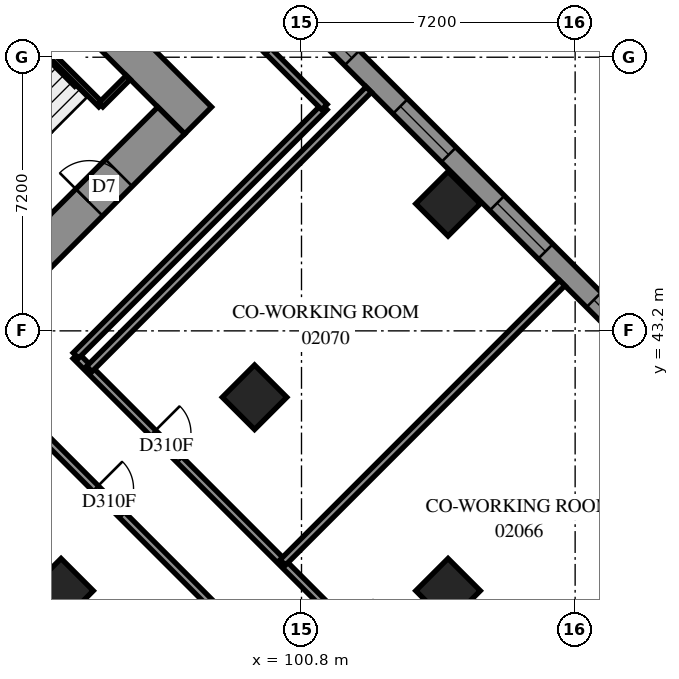
"""IFC4 building model, lengths in metres.
Left out: names, types, materials, properties, quantities, classifications, styles, units other than length and angle.
Written with IfcOpenShell. Run it as: python <this file> out.ifc"""

import sys

from ifc_helpers import new_model, si_unit, direction, frame, frame_2d, origin, origin_2d, place, context, subcontext, project, spatial, polyline, rectangle, outline, extrude, element, fill, save


model = new_model("IFC4")
c1 = context("Model", 3, precision=1e-05, world=origin(), true_north=direction((0.0, 1.0)))
c2 = subcontext(c1, "Body", "Model", "MODEL_VIEW")
j1 = project(units=[si_unit("LENGTHUNIT", "METRE"), si_unit("PLANEANGLEUNIT", "RADIAN")], contexts=[c1])
p1 = place(None, origin())
s1 = spatial("IfcSite", under=j1, at=p1, CompositionType="ELEMENT")
p2 = place(p1, origin())
s2 = spatial("IfcBuilding", under=s1, at=p2, CompositionType="ELEMENT")
p3 = place(p2, frame((0.0, 0.0, 10.2)))
s3 = spatial("IfcBuildingStorey", under=s2, at=p3, CompositionType="ELEMENT", Elevation=10.2)
for number, where, z_axis, x_axis in (
    (1, (104.656, 46.544, 0.0), (0.0, 0.0, 1.0), (0.707, -0.707, 0.0)),
    (2, (99.565, 41.453, 0.0), (0.0, 0.0, 1.0), (0.707, -0.707, 0.0)),
    (3, (94.474, 36.362, 0.0), (0.0, 0.0, 1.0), (0.707, -0.707, 0.0)),
    (4, (104.656, 36.362, 0.0), (0.0, 0.0, 1.0), (0.707, -0.707, 0.0)),
):
    element("IfcColumn", number, at=place(p3, frame(where, z_axis=z_axis, x_axis=x_axis)), inside=s3, PredefinedType="COLUMN", context=c2, shape_type="SweptSolid", body=[
        extrude(rectangle(XDim=1.2, YDim=1.2, at=origin_2d()), origin(), (0.0, 0.0, 1.0), 3.8),
    ])
p4 = place(p3, frame((86.483, 60.333, -0.4), z_axis=(0.0, 0.0, 1.0), x_axis=(0.70710983, -0.7071037324, 0.0)))
e5 = element("IfcWall", 5, at=p4, inside=s3, PredefinedType="SHEAR", context=c2, shape_type="SweptSolid", body=[
    extrude(rectangle(XDim=16.4, YDim=1.0, at=frame_2d((8.2, 0.0))), origin(), (0.0, 0.0, 1.0), 3.5),
])
p5 = place(p4, frame((11.0, 0.0, 0.4)))
e6 = element("IfcOpeningElement", 6, at=p5, cuts=e5, PredefinedType="OPENING", context=c2, shape_type="SweptSolid", body=[
    extrude(rectangle(XDim=0.8, YDim=2.1, at=frame_2d((0.4, 1.05))), frame((0.0, 0.51, 0.0), z_axis=(0.0, -1.0, 0.0), x_axis=(1.0, 0.0, 0.0)), (0.0, 0.0, 1.0), 1.02),
])
p6 = place(p3, frame((87.19, 38.554, -0.4), z_axis=(0.0, 0.0, 1.0), x_axis=(0.707103309, 0.7071102534, 0.0)))
e7 = element("IfcWall", 7, at=p6, inside=s3, PredefinedType="SHEAR", context=c2, shape_type="SweptSolid", body=[
    extrude(rectangle(XDim=14.4, YDim=1.0, at=frame_2d((7.2, 0.0))), origin(), (0.0, 0.0, 1.0), 3.5),
])
p7 = place(p6, frame((4.55, 0.0, 0.4)))
e8 = element("IfcOpeningElement", 8, at=p7, cuts=e7, PredefinedType="OPENING", context=c2, shape_type="SweptSolid", body=[
    extrude(rectangle(XDim=1.1, YDim=2.1, at=frame_2d((0.55, 1.05))), frame((0.0, 0.51, 0.0), z_axis=(0.0, -1.0, 0.0), x_axis=(1.0, 0.0, 0.0)), (0.0, 0.0, 1.0), 1.02),
])
p8 = place(p6, frame((11.35, 0.0, 0.4)))
e9 = element("IfcOpeningElement", 9, at=p8, cuts=e7, PredefinedType="OPENING", context=c2, shape_type="SweptSolid", body=[
    extrude(rectangle(XDim=1.1, YDim=2.1, at=frame_2d((0.55, 1.05))), frame((0.0, 0.51, 0.0), z_axis=(0.0, -1.0, 0.0), x_axis=(1.0, 0.0, 0.0)), (0.0, 0.0, 1.0), 1.02),
])
p9 = place(p3, frame((117.843, 34.665, 0.0), z_axis=(0.0, 0.0, 1.0), x_axis=(-0.7071067812, 0.7071067812, 0.0)))
e10 = element("IfcWall", 10, at=p9, inside=s3, PredefinedType="SOLIDWALL", context=c2, shape_type="SweptSolid", body=[
    extrude(outline(polyline([(-0.275, -0.275), (54.222, -0.275), (53.994, 0.275), (0.275, 0.275), (-0.275, -0.275)])), origin(), (0.0, 0.0, 1.0), 3.8),
])
p10 = place(p9, frame((0.8, 0.0, 0.7)))
e11 = element("IfcOpeningElement", 11, at=p10, cuts=e10, PredefinedType="OPENING", context=c2, shape_type="SweptSolid", body=[
    extrude(rectangle(XDim=1.8, YDim=2.6, at=frame_2d((0.9, 1.3))), frame((0.0, 0.285, 0.0), z_axis=(0.0, -1.0, 0.0), x_axis=(1.0, 0.0, 0.0)), (0.0, 0.0, 1.0), 0.57),
])
p11 = place(p9, frame((4.225, 0.0, 0.7)))
e12 = element("IfcOpeningElement", 12, at=p11, cuts=e10, PredefinedType="OPENING", context=c2, shape_type="SweptSolid", body=[
    extrude(rectangle(XDim=1.8, YDim=2.6, at=frame_2d((0.9, 1.3))), frame((0.0, 0.285, 0.0), z_axis=(0.0, -1.0, 0.0), x_axis=(1.0, 0.0, 0.0)), (0.0, 0.0, 1.0), 0.57),
])
p12 = place(p9, frame((7.825, 0.0, 0.7)))
e13 = element("IfcOpeningElement", 13, at=p12, cuts=e10, PredefinedType="OPENING", context=c2, shape_type="SweptSolid", body=[
    extrude(rectangle(XDim=1.8, YDim=2.6, at=frame_2d((0.9, 1.3))), frame((0.0, 0.285, 0.0), z_axis=(0.0, -1.0, 0.0), x_axis=(1.0, 0.0, 0.0)), (0.0, 0.0, 1.0), 0.57),
])
p13 = place(p9, frame((11.425, 0.0, 0.7)))
e14 = element("IfcOpeningElement", 14, at=p13, cuts=e10, PredefinedType="OPENING", context=c2, shape_type="SweptSolid", body=[
    extrude(rectangle(XDim=1.8, YDim=2.6, at=frame_2d((0.9, 1.3))), frame((0.0, 0.285, 0.0), z_axis=(0.0, -1.0, 0.0), x_axis=(1.0, 0.0, 0.0)), (0.0, 0.0, 1.0), 0.57),
])
p14 = place(p9, frame((15.025, 0.0, 0.7)))
e15 = element("IfcOpeningElement", 15, at=p14, cuts=e10, PredefinedType="OPENING", context=c2, shape_type="SweptSolid", body=[
    extrude(rectangle(XDim=1.8, YDim=2.6, at=frame_2d((0.9, 1.3))), frame((0.0, 0.285, 0.0), z_axis=(0.0, -1.0, 0.0), x_axis=(1.0, 0.0, 0.0)), (0.0, 0.0, 1.0), 0.57),
])
p15 = place(p9, frame((18.625, 0.0, 0.7)))
e16 = element("IfcOpeningElement", 16, at=p15, cuts=e10, PredefinedType="OPENING", context=c2, shape_type="SweptSolid", body=[
    extrude(rectangle(XDim=1.8, YDim=2.6, at=frame_2d((0.9, 1.3))), frame((0.0, 0.285, 0.0), z_axis=(0.0, -1.0, 0.0), x_axis=(1.0, 0.0, 0.0)), (0.0, 0.0, 1.0), 0.57),
])
p16 = place(p9, frame((22.225, 0.0, 0.7)))
e17 = element("IfcOpeningElement", 17, at=p16, cuts=e10, PredefinedType="OPENING", context=c2, shape_type="SweptSolid", body=[
    extrude(rectangle(XDim=1.8, YDim=2.6, at=frame_2d((0.9, 1.3))), frame((0.0, 0.285, 0.0), z_axis=(0.0, -1.0, 0.0), x_axis=(1.0, 0.0, 0.0)), (0.0, 0.0, 1.0), 0.57),
])
p17 = place(p9, frame((25.825, 0.0, 0.7)))
e18 = element("IfcOpeningElement", 18, at=p17, cuts=e10, PredefinedType="OPENING", context=c2, shape_type="SweptSolid", body=[
    extrude(rectangle(XDim=1.8, YDim=2.6, at=frame_2d((0.9, 1.3))), frame((0.0, 0.285, 0.0), z_axis=(0.0, -1.0, 0.0), x_axis=(1.0, 0.0, 0.0)), (0.0, 0.0, 1.0), 0.57),
])
p18 = place(p9, frame((29.425, 0.0, 0.7)))
e19 = element("IfcOpeningElement", 19, at=p18, cuts=e10, PredefinedType="OPENING", context=c2, shape_type="SweptSolid", body=[
    extrude(rectangle(XDim=1.8, YDim=2.6, at=frame_2d((0.9, 1.3))), frame((0.0, 0.285, 0.0), z_axis=(0.0, -1.0, 0.0), x_axis=(1.0, 0.0, 0.0)), (0.0, 0.0, 1.0), 0.57),
])
p19 = place(p9, frame((33.025, 0.0, 0.7)))
e20 = element("IfcOpeningElement", 20, at=p19, cuts=e10, PredefinedType="OPENING", context=c2, shape_type="SweptSolid", body=[
    extrude(rectangle(XDim=1.8, YDim=2.6, at=frame_2d((0.9, 1.3))), frame((0.0, 0.285, 0.0), z_axis=(0.0, -1.0, 0.0), x_axis=(1.0, 0.0, 0.0)), (0.0, 0.0, 1.0), 0.57),
])
p20 = place(p9, frame((36.625, 0.0, 0.7)))
e21 = element("IfcOpeningElement", 21, at=p20, cuts=e10, PredefinedType="OPENING", context=c2, shape_type="SweptSolid", body=[
    extrude(rectangle(XDim=1.8, YDim=2.6, at=frame_2d((0.9, 1.3))), frame((0.0, 0.285, 0.0), z_axis=(0.0, -1.0, 0.0), x_axis=(1.0, 0.0, 0.0)), (0.0, 0.0, 1.0), 0.57),
])
p21 = place(p9, frame((40.225, 0.0, 0.7)))
e22 = element("IfcOpeningElement", 22, at=p21, cuts=e10, PredefinedType="OPENING", context=c2, shape_type="SweptSolid", body=[
    extrude(rectangle(XDim=1.8, YDim=2.6, at=frame_2d((0.9, 1.3))), frame((0.0, 0.285, 0.0), z_axis=(0.0, -1.0, 0.0), x_axis=(1.0, 0.0, 0.0)), (0.0, 0.0, 1.0), 0.57),
])
p22 = place(p9, frame((43.825, 0.0, 0.7)))
e23 = element("IfcOpeningElement", 23, at=p22, cuts=e10, PredefinedType="OPENING", context=c2, shape_type="SweptSolid", body=[
    extrude(rectangle(XDim=1.8, YDim=2.6, at=frame_2d((0.9, 1.3))), frame((0.0, 0.285, 0.0), z_axis=(0.0, -1.0, 0.0), x_axis=(1.0, 0.0, 0.0)), (0.0, 0.0, 1.0), 0.57),
])
p23 = place(p9, frame((47.425, 0.0, 0.7)))
e24 = element("IfcOpeningElement", 24, at=p23, cuts=e10, PredefinedType="OPENING", context=c2, shape_type="SweptSolid", body=[
    extrude(rectangle(XDim=1.8, YDim=2.6, at=frame_2d((0.9, 1.3))), frame((0.0, 0.285, 0.0), z_axis=(0.0, -1.0, 0.0), x_axis=(1.0, 0.0, 0.0)), (0.0, 0.0, 1.0), 0.57),
])
p24 = place(p9, frame((50.96, 0.0, 0.7)))
e25 = element("IfcOpeningElement", 25, at=p24, cuts=e10, PredefinedType="OPENING", context=c2, shape_type="SweptSolid", body=[
    extrude(rectangle(XDim=1.8, YDim=2.6, at=frame_2d((0.9, 1.3))), frame((0.0, 0.285, 0.0), z_axis=(0.0, -1.0, 0.0), x_axis=(1.0, 0.0, 0.0)), (0.0, 0.0, 1.0), 0.57),
])
p25 = place(p3, frame((77.07, 42.275, 0.0), z_axis=(0.0, 0.0, 1.0), x_axis=(0.7071067812, -0.7071067812, 0.0)))
e26 = element("IfcWall", 26, at=p25, inside=s3, PredefinedType="SOLIDWALL", context=c2, shape_type="SweptSolid", body=[
    extrude(outline(polyline([(0.114, -0.275), (39.288, -0.275), (38.737, 0.275), (-0.114, 0.275), (0.114, -0.275)])), origin(), (0.0, 0.0, 1.0), 3.8),
])
p26 = place(p25, frame((2.837, 0.0, 0.7)))
e27 = element("IfcOpeningElement", 27, at=p26, cuts=e26, PredefinedType="OPENING", context=c2, shape_type="SweptSolid", body=[
    extrude(rectangle(XDim=1.8, YDim=2.6, at=frame_2d((0.9, 1.3))), frame((0.0, 0.285, 0.0), z_axis=(0.0, -1.0, 0.0), x_axis=(1.0, 0.0, 0.0)), (0.0, 0.0, 1.0), 0.57),
])
p27 = place(p25, frame((6.588, 0.0, 0.7)))
e28 = element("IfcOpeningElement", 28, at=p27, cuts=e26, PredefinedType="OPENING", context=c2, shape_type="SweptSolid", body=[
    extrude(rectangle(XDim=1.8, YDim=2.6, at=frame_2d((0.9, 1.3))), frame((0.0, 0.285, 0.0), z_axis=(0.0, -1.0, 0.0), x_axis=(1.0, 0.0, 0.0)), (0.0, 0.0, 1.0), 0.57),
])
p28 = place(p25, frame((10.188, 0.0, 0.7)))
e29 = element("IfcOpeningElement", 29, at=p28, cuts=e26, PredefinedType="OPENING", context=c2, shape_type="SweptSolid", body=[
    extrude(rectangle(XDim=1.8, YDim=2.6, at=frame_2d((0.9, 1.3))), frame((0.0, 0.285, 0.0), z_axis=(0.0, -1.0, 0.0), x_axis=(1.0, 0.0, 0.0)), (0.0, 0.0, 1.0), 0.57),
])
p29 = place(p25, frame((13.787, 0.0, 0.7)))
e30 = element("IfcOpeningElement", 30, at=p29, cuts=e26, PredefinedType="OPENING", context=c2, shape_type="SweptSolid", body=[
    extrude(rectangle(XDim=1.8, YDim=2.6, at=frame_2d((0.9, 1.3))), frame((0.0, 0.285, 0.0), z_axis=(0.0, -1.0, 0.0), x_axis=(1.0, 0.0, 0.0)), (0.0, 0.0, 1.0), 0.57),
])
p30 = place(p25, frame((17.387, 0.0, 0.7)))
e31 = element("IfcOpeningElement", 31, at=p30, cuts=e26, PredefinedType="OPENING", context=c2, shape_type="SweptSolid", body=[
    extrude(rectangle(XDim=1.8, YDim=2.6, at=frame_2d((0.9, 1.3))), frame((0.0, 0.285, 0.0), z_axis=(0.0, -1.0, 0.0), x_axis=(1.0, 0.0, 0.0)), (0.0, 0.0, 1.0), 0.57),
])
p31 = place(p25, frame((20.988, 0.0, 0.7)))
e32 = element("IfcOpeningElement", 32, at=p31, cuts=e26, PredefinedType="OPENING", context=c2, shape_type="SweptSolid", body=[
    extrude(rectangle(XDim=1.8, YDim=2.6, at=frame_2d((0.9, 1.3))), frame((0.0, 0.285, 0.0), z_axis=(0.0, -1.0, 0.0), x_axis=(1.0, 0.0, 0.0)), (0.0, 0.0, 1.0), 0.57),
])
p32 = place(p25, frame((24.587, 0.0, 0.7)))
e33 = element("IfcOpeningElement", 33, at=p32, cuts=e26, PredefinedType="OPENING", context=c2, shape_type="SweptSolid", body=[
    extrude(rectangle(XDim=1.8, YDim=2.6, at=frame_2d((0.9, 1.3))), frame((0.0, 0.285, 0.0), z_axis=(0.0, -1.0, 0.0), x_axis=(1.0, 0.0, 0.0)), (0.0, 0.0, 1.0), 0.57),
])
p33 = place(p25, frame((28.188, 0.0, 0.7)))
e34 = element("IfcOpeningElement", 34, at=p33, cuts=e26, PredefinedType="OPENING", context=c2, shape_type="SweptSolid", body=[
    extrude(rectangle(XDim=1.8, YDim=2.6, at=frame_2d((0.9, 1.3))), frame((0.0, 0.285, 0.0), z_axis=(0.0, -1.0, 0.0), x_axis=(1.0, 0.0, 0.0)), (0.0, 0.0, 1.0), 0.57),
])
p34 = place(p25, frame((31.788, 0.0, 0.7)))
e35 = element("IfcOpeningElement", 35, at=p34, cuts=e26, PredefinedType="OPENING", context=c2, shape_type="SweptSolid", body=[
    extrude(rectangle(XDim=1.8, YDim=2.6, at=frame_2d((0.9, 1.3))), frame((0.0, 0.285, 0.0), z_axis=(0.0, -1.0, 0.0), x_axis=(1.0, 0.0, 0.0)), (0.0, 0.0, 1.0), 0.57),
])
p35 = place(p25, frame((35.388, 0.0, 0.7)))
e36 = element("IfcOpeningElement", 36, at=p35, cuts=e26, PredefinedType="OPENING", context=c2, shape_type="SweptSolid", body=[
    extrude(rectangle(XDim=1.8, YDim=2.6, at=frame_2d((0.9, 1.3))), frame((0.0, 0.285, 0.0), z_axis=(0.0, -1.0, 0.0), x_axis=(1.0, 0.0, 0.0)), (0.0, 0.0, 1.0), 0.57),
])
p36 = place(p3, frame((91.313, 53.354, 0.0), z_axis=(0.0, 0.0, 1.0), x_axis=(0.7071067812, -0.7071067812, 0.0)))
e37 = element("IfcWall", 37, at=p36, inside=s3, PredefinedType="PARTITIONING", context=c2, shape_type="SweptSolid", body=[
    extrude(rectangle(XDim=5.95, YDim=0.15, at=frame_2d((2.975, 0.0))), origin(), (0.0, 0.0, 1.0), 3.8),
])
p37 = place(p3, frame((95.52, 49.146, 0.0), z_axis=(0.0, 0.0, 1.0), x_axis=(0.7071067812, 0.7071067812, 0.0)))
e38 = element("IfcWall", 38, at=p37, inside=s3, PredefinedType="PARTITIONING", context=c2, shape_type="SweptSolid", body=[
    extrude(rectangle(XDim=1.02, YDim=0.15, at=frame_2d((0.51, 0.0))), origin(), (0.0, 0.0, 1.0), 3.8),
])
p38 = place(p3, frame((94.861, 42.544, 0.0), z_axis=(0.0, 0.0, 1.0), x_axis=(0.7071067812, -0.7071067812, 0.0)))
e39 = element("IfcWall", 39, at=p38, inside=s3, PredefinedType="PARTITIONING", context=c2, shape_type="SweptSolid", body=[
    extrude(rectangle(XDim=25.699, YDim=0.2, at=frame_2d((12.85, 0.0))), origin(), (0.0, 0.0, 1.0), 3.8),
])
p39 = place(p38, frame((10.072, 0.0, 0.0)))
e40 = element("IfcOpeningElement", 40, at=p39, cuts=e39, PredefinedType="OPENING", context=c2, shape_type="SweptSolid", body=[
    extrude(rectangle(XDim=1.0, YDim=2.1, at=frame_2d((0.5, 1.05))), frame((0.0, 0.11, 0.0), z_axis=(0.0, -1.0, 0.0), x_axis=(1.0, 0.0, 0.0)), (0.0, 0.0, 1.0), 0.22),
])
p40 = place(p38, frame((2.872, 0.0, 0.0)))
e41 = element("IfcOpeningElement", 41, at=p40, cuts=e39, PredefinedType="OPENING", context=c2, shape_type="SweptSolid", body=[
    extrude(rectangle(XDim=1.0, YDim=2.1, at=frame_2d((0.5, 1.05))), frame((0.0, 0.11, 0.0), z_axis=(0.0, -1.0, 0.0), x_axis=(1.0, 0.0, 0.0)), (0.0, 0.0, 1.0), 0.22),
])
p41 = place(p38, frame((17.272, 0.0, 0.0)))
e42 = element("IfcOpeningElement", 42, at=p41, cuts=e39, PredefinedType="OPENING", context=c2, shape_type="SweptSolid", body=[
    extrude(rectangle(XDim=1.0, YDim=2.1, at=frame_2d((0.5, 1.05))), frame((0.0, 0.11, 0.0), z_axis=(0.0, -1.0, 0.0), x_axis=(1.0, 0.0, 0.0)), (0.0, 0.0, 1.0), 0.22),
])
p42 = place(p38, frame((22.606, 0.0, 0.0)))
e43 = element("IfcOpeningElement", 43, at=p42, cuts=e39, PredefinedType="OPENING", context=c2, shape_type="SweptSolid", body=[
    extrude(rectangle(XDim=1.0, YDim=2.1, at=frame_2d((0.5, 1.05))), frame((0.0, 0.11, 0.0), z_axis=(0.0, -1.0, 0.0), x_axis=(1.0, 0.0, 0.0)), (0.0, 0.0, 1.0), 0.22),
])
p43 = place(p3, frame((93.375, 41.061, 0.0), z_axis=(0.0, 0.0, 1.0), x_axis=(0.7071067812, -0.7071067812, 0.0)))
e44 = element("IfcWall", 44, at=p43, inside=s3, PredefinedType="PARTITIONING", context=c2, shape_type="SweptSolid", body=[
    extrude(rectangle(XDim=25.699, YDim=0.2, at=frame_2d((12.85, 0.0))), origin(), (0.0, 0.0, 1.0), 3.8),
])
p44 = place(p43, frame((2.837, 0.0, 0.0)))
e45 = element("IfcOpeningElement", 45, at=p44, cuts=e44, PredefinedType="OPENING", context=c2, shape_type="SweptSolid", body=[
    extrude(rectangle(XDim=1.0, YDim=2.1, at=frame_2d((0.5, 1.05))), frame((0.0, 0.11, 0.0), z_axis=(0.0, -1.0, 0.0), x_axis=(1.0, 0.0, 0.0)), (0.0, 0.0, 1.0), 0.22),
])
p45 = place(p43, frame((10.037, 0.0, 0.0)))
e46 = element("IfcOpeningElement", 46, at=p45, cuts=e44, PredefinedType="OPENING", context=c2, shape_type="SweptSolid", body=[
    extrude(rectangle(XDim=1.0, YDim=2.1, at=frame_2d((0.5, 1.05))), frame((0.0, 0.11, 0.0), z_axis=(0.0, -1.0, 0.0), x_axis=(1.0, 0.0, 0.0)), (0.0, 0.0, 1.0), 0.22),
])
p46 = place(p43, frame((15.425, 0.0, 0.0)))
e47 = element("IfcOpeningElement", 47, at=p46, cuts=e44, PredefinedType="OPENING", context=c2, shape_type="SweptSolid", body=[
    extrude(rectangle(XDim=1.0, YDim=2.1, at=frame_2d((0.5, 1.05))), frame((0.0, 0.11, 0.0), z_axis=(0.0, -1.0, 0.0), x_axis=(1.0, 0.0, 0.0)), (0.0, 0.0, 1.0), 0.22),
])
p47 = place(p43, frame((22.057, 0.0, 0.0)))
e48 = element("IfcOpeningElement", 48, at=p47, cuts=e44, PredefinedType="OPENING", context=c2, shape_type="SweptSolid", body=[
    extrude(rectangle(XDim=1.0, YDim=2.1, at=frame_2d((0.5, 1.05))), frame((0.0, 0.11, 0.0), z_axis=(0.0, -1.0, 0.0), x_axis=(1.0, 0.0, 0.0)), (0.0, 0.0, 1.0), 0.22),
])
for number, where, z_axis, x_axis in (
    (49, (105.398, 32.014, 0.0), (0.0, 0.0, 1.0), (0.707, 0.707, 0.0)),
    (50, (100.307, 37.105, 0.0), (0.0, 0.0, 1.0), (0.707, 0.707, 0.0)),
    (51, (95.215, 42.197, 0.0), (0.0, 0.0, 1.0), (0.707, 0.707, 0.0)),
):
    element("IfcWall", number, at=place(p3, frame(where, z_axis=z_axis, x_axis=x_axis)), inside=s3, PredefinedType="PARTITIONING", context=c2, shape_type="SweptSolid", body=[
        extrude(rectangle(XDim=10.4, YDim=0.2, at=frame_2d((5.2, 0.0))), origin(), (0.0, 0.0, 1.0), 3.8),
    ])
p48 = place(p3, frame((94.863, 42.551, 0.0), z_axis=(0.0, 0.0, 1.0), x_axis=(0.7071067812, 0.7071067812, 0.0)))
e52 = element("IfcWall", 52, at=p48, inside=s3, PredefinedType="PARTITIONING", context=c2, shape_type="SweptSolid", body=[
    extrude(rectangle(XDim=9.249, YDim=0.2, at=frame_2d((4.625, 0.0))), origin(), (0.0, 0.0, 1.0), 3.8),
])
p49 = place(p3, frame((99.918, 50.574, 0.0), z_axis=(0.0, 0.0, 1.0), x_axis=(0.7075827869, -0.7066304548, 0.0)))
e53 = element("IfcWall", 53, at=p49, inside=s3, PredefinedType="PARTITIONING", context=c2, shape_type="SweptSolid", body=[
    extrude(rectangle(XDim=2.1, YDim=0.2, at=frame_2d((1.05, 0.0))), origin(), (0.0, 0.0, 1.0), 3.8),
])
p50 = place(p3, frame((99.453, 51.033, 0.0), z_axis=(0.0, 0.0, 1.0), x_axis=(0.7071067812, -0.7071067812, 0.0)))
e54 = element("IfcWall", 54, at=p50, inside=s3, PredefinedType="PARTITIONING", context=c2, shape_type="SweptSolid", body=[
    extrude(rectangle(XDim=0.653, YDim=0.2, at=frame_2d((0.327, 0.0))), origin(), (0.0, 0.0, 1.0), 3.8),
])
p51 = place(p13, origin())
e55 = element("IfcWindow", 55, at=p51, inside=s3, PartitioningType="SINGLE_PANEL", PredefinedType="WINDOW", context=c2, shape_type="SweptSolid", body=[
    extrude(rectangle(XDim=1.8, YDim=2.6, at=frame_2d((0.9, 1.3))), frame((0.0, 0.155, 0.0), z_axis=(0.0, -1.0, 0.0), x_axis=(1.0, 0.0, 0.0)), (0.0, 0.0, 1.0), 0.06),
])
fill(e14, e55)
p52 = place(p14, origin())
e56 = element("IfcWindow", 56, at=p52, inside=s3, PartitioningType="SINGLE_PANEL", PredefinedType="WINDOW", context=c2, shape_type="SweptSolid", body=[
    extrude(rectangle(XDim=1.8, YDim=2.6, at=frame_2d((0.9, 1.3))), frame((0.0, 0.155, 0.0), z_axis=(0.0, -1.0, 0.0), x_axis=(1.0, 0.0, 0.0)), (0.0, 0.0, 1.0), 0.06),
])
fill(e15, e56)
p53 = place(p15, origin())
e57 = element("IfcWindow", 57, at=p53, inside=s3, PartitioningType="SINGLE_PANEL", PredefinedType="WINDOW", context=c2, shape_type="SweptSolid", body=[
    extrude(rectangle(XDim=1.8, YDim=2.6, at=frame_2d((0.9, 1.3))), frame((0.0, 0.155, 0.0), z_axis=(0.0, -1.0, 0.0), x_axis=(1.0, 0.0, 0.0)), (0.0, 0.0, 1.0), 0.06),
])
fill(e16, e57)
p54 = place(p16, origin())
e58 = element("IfcWindow", 58, at=p54, inside=s3, PartitioningType="SINGLE_PANEL", PredefinedType="WINDOW", context=c2, shape_type="SweptSolid", body=[
    extrude(rectangle(XDim=1.8, YDim=2.6, at=frame_2d((0.9, 1.3))), frame((0.0, 0.155, 0.0), z_axis=(0.0, -1.0, 0.0), x_axis=(1.0, 0.0, 0.0)), (0.0, 0.0, 1.0), 0.06),
])
fill(e17, e58)
p55 = place(p8, origin())
e59 = element("IfcDoor", 59, at=p55, inside=s3, OperationType="SINGLE_SWING_RIGHT", PredefinedType="DOOR", context=c2, shape_type="SweptSolid", body=[
    extrude(rectangle(XDim=1.1, YDim=2.1, at=frame_2d((0.55, 1.05))), frame((0.0, 0.025, 0.0), z_axis=(0.0, -1.0, 0.0), x_axis=(1.0, 0.0, 0.0)), (0.0, 0.0, 1.0), 0.05),
])
fill(e9, e59)
p56 = place(p44, origin())
e60 = element("IfcDoor", 60, at=p56, inside=s3, OperationType="SINGLE_SWING_LEFT", PredefinedType="DOOR", context=c2, shape_type="SweptSolid", body=[
    extrude(rectangle(XDim=1.0, YDim=2.1, at=frame_2d((0.5, 1.05))), frame((0.0, 0.025, 0.0), z_axis=(0.0, -1.0, 0.0), x_axis=(1.0, 0.0, 0.0)), (0.0, 0.0, 1.0), 0.05),
])
fill(e45, e60)
p57 = place(p40, origin())
e61 = element("IfcDoor", 61, at=p57, inside=s3, OperationType="SINGLE_SWING_RIGHT", PredefinedType="DOOR", context=c2, shape_type="SweptSolid", body=[
    extrude(rectangle(XDim=1.0, YDim=2.1, at=frame_2d((0.5, 1.05))), frame((0.0, 0.025, 0.0), z_axis=(0.0, -1.0, 0.0), x_axis=(1.0, 0.0, 0.0)), (0.0, 0.0, 1.0), 0.05),
])
fill(e41, e61)
save(model, sys.argv[1])
